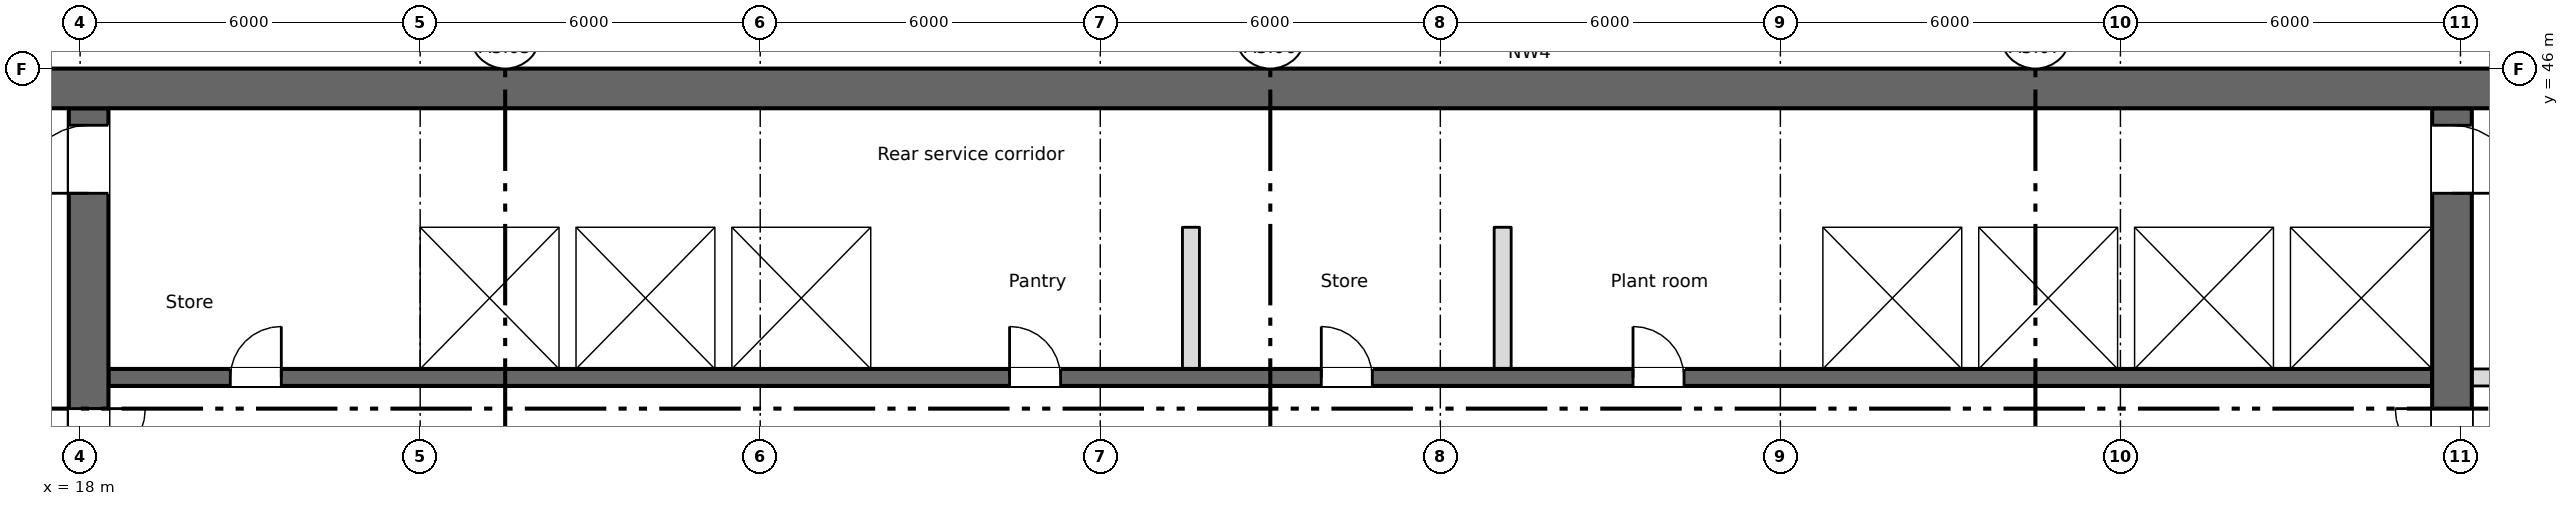
"""IFC4 building model, lengths in metres.
Left out: names, types, materials, properties, quantities, classifications, styles, units other than length and angle.
Written with IfcOpenShell. Run it as: python <this file> out.ifc"""

import sys

from ifc_helpers import new_model, si_unit, direction, frame, frame_2d, origin, place, context, subcontext, project, spatial, rectangle, extrude, element, fill, save


model = new_model("IFC4")
c1 = context("Model", 3, precision=1e-05, world=origin(), true_north=direction((0.0, 1.0)))
c2 = subcontext(c1, "Body", "Model", "MODEL_VIEW")
j1 = project(units=[si_unit("LENGTHUNIT", "METRE"), si_unit("PLANEANGLEUNIT", "RADIAN")], contexts=[c1])
p1 = place(None, origin())
s1 = spatial("IfcSite", under=j1, at=p1, CompositionType="ELEMENT")
p2 = place(p1, origin())
s2 = spatial("IfcBuilding", under=s1, at=p2, CompositionType="ELEMENT")
p3 = place(p2, frame((0.0, 0.0, 208.0)))
s3 = spatial("IfcBuildingStorey", under=s2, at=p3, CompositionType="ELEMENT", Elevation=208.0)
p4 = place(p3, frame((11.55, 45.65, 0.0), z_axis=(0.0, 0.0, 1.0), x_axis=(1.0, 0.0, 0.0)))
e1 = element("IfcWall", 1, at=p4, inside=s3, PredefinedType="SHEAR", context=c2, shape_type="SweptSolid", body=[
    extrude(rectangle(XDim=54.9, YDim=0.7, at=frame_2d((27.45, 0.0))), origin(), (0.0, 0.0, 1.0), 3.35),
])
p5 = place(p3, frame((18.15, 28.4, 0.0), z_axis=(0.0, 0.0, 1.0), x_axis=(0.0, 1.0, 0.0)))
e2 = element("IfcWall", 2, at=p5, inside=s3, PredefinedType="SHEAR", context=c2, shape_type="SweptSolid", body=[
    extrude(rectangle(XDim=16.9, YDim=0.7, at=frame_2d((8.45, 0.0))), origin(), (0.0, 0.0, 1.0), 3.35),
])
p6 = place(p5, frame((9.6, 0.0, 0.0)))
e3 = element("IfcOpeningElement", 3, at=p6, cuts=e2, PredefinedType="OPENING", context=c2, shape_type="SweptSolid", body=[
    extrude(rectangle(XDim=2.0, YDim=2.1, at=frame_2d((1.0, 1.05))), frame((0.0, 0.36, 0.0), z_axis=(0.0, -1.0, 0.0), x_axis=(1.0, 0.0, 0.0)), (0.0, 0.0, 1.0), 0.72),
])
p7 = place(p5, frame((15.4, 0.0, 0.0)))
e4 = element("IfcOpeningElement", 4, at=p7, cuts=e2, PredefinedType="OPENING", context=c2, shape_type="SweptSolid", body=[
    extrude(rectangle(XDim=1.2, YDim=2.1, at=frame_2d((0.6, 1.05))), frame((0.0, 0.36, 0.0), z_axis=(0.0, -1.0, 0.0), x_axis=(1.0, 0.0, 0.0)), (0.0, 0.0, 1.0), 0.72),
])
p8 = place(p3, frame((59.85, 28.4, 0.0), z_axis=(0.0, 0.0, 1.0), x_axis=(0.0, 1.0, 0.0)))
e5 = element("IfcWall", 5, at=p8, inside=s3, PredefinedType="SHEAR", context=c2, shape_type="SweptSolid", body=[
    extrude(rectangle(XDim=16.9, YDim=0.7, at=frame_2d((8.45, 0.0))), origin(), (0.0, 0.0, 1.0), 3.35),
])
p9 = place(p8, frame((9.6, 0.0, 0.0)))
e6 = element("IfcOpeningElement", 6, at=p9, cuts=e5, PredefinedType="OPENING", context=c2, shape_type="SweptSolid", body=[
    extrude(rectangle(XDim=2.0, YDim=2.1, at=frame_2d((1.0, 1.05))), frame((0.0, 0.36, 0.0), z_axis=(0.0, -1.0, 0.0), x_axis=(1.0, 0.0, 0.0)), (0.0, 0.0, 1.0), 0.72),
])
p10 = place(p8, frame((15.4, 0.0, 0.0)))
e7 = element("IfcOpeningElement", 7, at=p10, cuts=e5, PredefinedType="OPENING", context=c2, shape_type="SweptSolid", body=[
    extrude(rectangle(XDim=1.2, YDim=2.1, at=frame_2d((0.6, 1.05))), frame((0.0, 0.36, 0.0), z_axis=(0.0, -1.0, 0.0), x_axis=(1.0, 0.0, 0.0)), (0.0, 0.0, 1.0), 0.72),
])
p11 = place(p3, frame((18.5, 40.55, 0.0), z_axis=(0.0, 0.0, 1.0), x_axis=(1.0, 0.0, 0.0)))
e8 = element("IfcWall", 8, at=p11, inside=s3, PredefinedType="SHEAR", context=c2, shape_type="SweptSolid", body=[
    extrude(rectangle(XDim=41.0, YDim=0.3, at=frame_2d((20.5, 0.0))), origin(), (0.0, 0.0, 1.0), 3.35),
])
p12 = place(p11, frame((2.15, 0.0, 0.0)))
e9 = element("IfcOpeningElement", 9, at=p12, cuts=e8, PredefinedType="OPENING", context=c2, shape_type="SweptSolid", body=[
    extrude(rectangle(XDim=0.9, YDim=2.1, at=frame_2d((0.45, 1.05))), frame((0.0, 0.16, 0.0), z_axis=(0.0, -1.0, 0.0), x_axis=(1.0, 0.0, 0.0)), (0.0, 0.0, 1.0), 0.32),
])
p13 = place(p11, frame((15.9, 0.0, 0.0)))
e10 = element("IfcOpeningElement", 10, at=p13, cuts=e8, PredefinedType="OPENING", context=c2, shape_type="SweptSolid", body=[
    extrude(rectangle(XDim=0.9, YDim=2.1, at=frame_2d((0.45, 1.05))), frame((0.0, 0.16, 0.0), z_axis=(0.0, -1.0, 0.0), x_axis=(1.0, 0.0, 0.0)), (0.0, 0.0, 1.0), 0.32),
])
p14 = place(p11, frame((21.4, 0.0, 0.0)))
e11 = element("IfcOpeningElement", 11, at=p14, cuts=e8, PredefinedType="OPENING", context=c2, shape_type="SweptSolid", body=[
    extrude(rectangle(XDim=0.9, YDim=2.1, at=frame_2d((0.45, 1.05))), frame((0.0, 0.16, 0.0), z_axis=(0.0, -1.0, 0.0), x_axis=(1.0, 0.0, 0.0)), (0.0, 0.0, 1.0), 0.32),
])
p15 = place(p11, frame((26.9, 0.0, 0.0)))
e12 = element("IfcOpeningElement", 12, at=p15, cuts=e8, PredefinedType="OPENING", context=c2, shape_type="SweptSolid", body=[
    extrude(rectangle(XDim=0.9, YDim=2.1, at=frame_2d((0.45, 1.05))), frame((0.0, 0.16, 0.0), z_axis=(0.0, -1.0, 0.0), x_axis=(1.0, 0.0, 0.0)), (0.0, 0.0, 1.0), 0.32),
])
p16 = place(p11, frame((6.175, 0.0, 0.0)))
e13 = element("IfcOpeningElement", 13, at=p16, cuts=e8, PredefinedType="OPENING", context=c2, shape_type="SweptSolid", body=[
    extrude(rectangle(XDim=1.1, YDim=2.1, at=frame_2d((0.55, 1.05))), frame((0.0, 0.16, 0.0), z_axis=(0.0, -1.0, 0.0), x_axis=(1.0, 0.0, 0.0)), (0.0, 0.0, 1.0), 0.32),
])
p17 = place(p11, frame((8.925, 0.0, 0.0)))
e14 = element("IfcOpeningElement", 14, at=p17, cuts=e8, PredefinedType="OPENING", context=c2, shape_type="SweptSolid", body=[
    extrude(rectangle(XDim=1.1, YDim=2.1, at=frame_2d((0.55, 1.05))), frame((0.0, 0.16, 0.0), z_axis=(0.0, -1.0, 0.0), x_axis=(1.0, 0.0, 0.0)), (0.0, 0.0, 1.0), 0.32),
])
p18 = place(p11, frame((11.675, 0.0, 0.0)))
e15 = element("IfcOpeningElement", 15, at=p18, cuts=e8, PredefinedType="OPENING", context=c2, shape_type="SweptSolid", body=[
    extrude(rectangle(XDim=1.1, YDim=2.1, at=frame_2d((0.55, 1.05))), frame((0.0, 0.16, 0.0), z_axis=(0.0, -1.0, 0.0), x_axis=(1.0, 0.0, 0.0)), (0.0, 0.0, 1.0), 0.32),
])
p19 = place(p11, frame((30.925, 0.0, 0.0)))
e16 = element("IfcOpeningElement", 16, at=p19, cuts=e8, PredefinedType="OPENING", context=c2, shape_type="SweptSolid", body=[
    extrude(rectangle(XDim=1.1, YDim=2.1, at=frame_2d((0.55, 1.05))), frame((0.0, 0.16, 0.0), z_axis=(0.0, -1.0, 0.0), x_axis=(1.0, 0.0, 0.0)), (0.0, 0.0, 1.0), 0.32),
])
p20 = place(p11, frame((33.675, 0.0, 0.0)))
e17 = element("IfcOpeningElement", 17, at=p20, cuts=e8, PredefinedType="OPENING", context=c2, shape_type="SweptSolid", body=[
    extrude(rectangle(XDim=1.1, YDim=2.1, at=frame_2d((0.55, 1.05))), frame((0.0, 0.16, 0.0), z_axis=(0.0, -1.0, 0.0), x_axis=(1.0, 0.0, 0.0)), (0.0, 0.0, 1.0), 0.32),
])
p21 = place(p11, frame((36.375, 0.0, 0.0)))
e18 = element("IfcOpeningElement", 18, at=p21, cuts=e8, PredefinedType="OPENING", context=c2, shape_type="SweptSolid", body=[
    extrude(rectangle(XDim=1.2, YDim=2.1, at=frame_2d((0.6, 1.05))), frame((0.0, 0.16, 0.0), z_axis=(0.0, -1.0, 0.0), x_axis=(1.0, 0.0, 0.0)), (0.0, 0.0, 1.0), 0.32),
])
p22 = place(p11, frame((39.15, 0.0, 0.0)))
e19 = element("IfcOpeningElement", 19, at=p22, cuts=e8, PredefinedType="OPENING", context=c2, shape_type="SweptSolid", body=[
    extrude(rectangle(XDim=1.2, YDim=2.1, at=frame_2d((0.6, 1.05))), frame((0.0, 0.16, 0.0), z_axis=(0.0, -1.0, 0.0), x_axis=(1.0, 0.0, 0.0)), (0.0, 0.0, 1.0), 0.32),
])
p23 = place(p3, frame((18.5, 43.35, 0.0), z_axis=(0.0, 0.0, 1.0), x_axis=(1.0, 0.0, 0.0)))
e20 = element("IfcWall", 20, at=p23, inside=s3, PredefinedType="SHEAR", context=c2, shape_type="SweptSolid", body=[
    extrude(rectangle(XDim=41.0, YDim=0.3, at=frame_2d((20.5, 0.0))), origin(), (0.0, 0.0, 1.0), 3.35),
])
p24 = place(p3, frame((60.2, 40.55, 0.0), z_axis=(0.0, 0.0, 1.0), x_axis=(1.0, 0.0, 0.0)))
e21 = element("IfcWall", 21, at=p24, inside=s3, PredefinedType="PARTITIONING", context=c2, shape_type="SweptSolid", body=[
    extrude(rectangle(XDim=2.5, YDim=0.3, at=frame_2d((1.25, 0.0))), origin(), (0.0, 0.0, 1.0), 3.35),
])
p25 = place(p24, frame((0.725, 0.0, 0.0)))
e22 = element("IfcOpeningElement", 22, at=p25, cuts=e21, PredefinedType="OPENING", context=c2, shape_type="SweptSolid", body=[
    extrude(rectangle(XDim=0.9, YDim=2.1, at=frame_2d((0.45, 1.05))), frame((0.0, 0.16, 0.0), z_axis=(0.0, -1.0, 0.0), x_axis=(1.0, 0.0, 0.0)), (0.0, 0.0, 1.0), 0.32),
])
for number, where, z_axis, x_axis in (
    (23, (23.85, 40.7, 0.0), (0.0, 0.0, 1.0), (0.0, 1.0, 0.0)),
    (24, (26.6, 40.7, 0.0), (0.0, 0.0, 1.0), (0.0, 1.0, 0.0)),
    (25, (29.35, 40.7, 0.0), (0.0, 0.0, 1.0), (0.0, 1.0, 0.0)),
    (26, (32.1, 40.7, 0.0), (0.0, 0.0, 1.0), (0.0, 1.0, 0.0)),
    (27, (48.6, 40.7, 0.0), (0.0, 0.0, 1.0), (0.0, 1.0, 0.0)),
    (28, (51.35, 40.7, 0.0), (0.0, 0.0, 1.0), (0.0, 1.0, 0.0)),
    (29, (54.1, 40.7, 0.0), (0.0, 0.0, 1.0), (0.0, 1.0, 0.0)),
    (30, (56.85, 40.7, 0.0), (0.0, 0.0, 1.0), (0.0, 1.0, 0.0)),
):
    element("IfcWall", number, at=place(p3, frame(where, z_axis=z_axis, x_axis=x_axis)), inside=s3, PredefinedType="SHEAR", context=c2, shape_type="SweptSolid", body=[
        extrude(rectangle(XDim=2.5, YDim=0.3, at=frame_2d((1.25, 0.0))), origin(), (0.0, 0.0, 1.0), 3.35),
    ])
for number, where, z_axis, x_axis in (
    (31, (37.6, 40.7, 0.0), (0.0, 0.0, 1.0), (0.0, 1.0, 0.0)),
    (32, (43.1, 40.7, 0.0), (0.0, 0.0, 1.0), (0.0, 1.0, 0.0)),
):
    element("IfcWall", number, at=place(p3, frame(where, z_axis=z_axis, x_axis=x_axis)), inside=s3, PredefinedType="PARTITIONING", context=c2, shape_type="SweptSolid", body=[
        extrude(rectangle(XDim=2.5, YDim=0.3, at=frame_2d((1.25, 0.0))), origin(), (0.0, 0.0, 1.0), 3.35),
    ])
p26 = place(p12, origin())
e33 = element("IfcDoor", 33, at=p26, inside=s3, OperationType="SINGLE_SWING_RIGHT", PredefinedType="DOOR", context=c2, shape_type="SweptSolid", body=[
    extrude(rectangle(XDim=0.9, YDim=2.1, at=frame_2d((0.45, 1.05))), frame((0.0, 0.025, 0.0), z_axis=(0.0, -1.0, 0.0), x_axis=(1.0, 0.0, 0.0)), (0.0, 0.0, 1.0), 0.05),
])
fill(e9, e33)
p27 = place(p13, origin())
e34 = element("IfcDoor", 34, at=p27, inside=s3, OperationType="SINGLE_SWING_LEFT", PredefinedType="DOOR", context=c2, shape_type="SweptSolid", body=[
    extrude(rectangle(XDim=0.9, YDim=2.1, at=frame_2d((0.45, 1.05))), frame((0.0, 0.025, 0.0), z_axis=(0.0, -1.0, 0.0), x_axis=(1.0, 0.0, 0.0)), (0.0, 0.0, 1.0), 0.05),
])
fill(e10, e34)
p28 = place(p14, origin())
e35 = element("IfcDoor", 35, at=p28, inside=s3, OperationType="SINGLE_SWING_LEFT", PredefinedType="DOOR", context=c2, shape_type="SweptSolid", body=[
    extrude(rectangle(XDim=0.9, YDim=2.1, at=frame_2d((0.45, 1.05))), frame((0.0, 0.025, 0.0), z_axis=(0.0, -1.0, 0.0), x_axis=(1.0, 0.0, 0.0)), (0.0, 0.0, 1.0), 0.05),
])
fill(e11, e35)
p29 = place(p15, origin())
e36 = element("IfcDoor", 36, at=p29, inside=s3, OperationType="SINGLE_SWING_LEFT", PredefinedType="DOOR", context=c2, shape_type="SweptSolid", body=[
    extrude(rectangle(XDim=0.9, YDim=2.1, at=frame_2d((0.45, 1.05))), frame((0.0, 0.025, 0.0), z_axis=(0.0, -1.0, 0.0), x_axis=(1.0, 0.0, 0.0)), (0.0, 0.0, 1.0), 0.05),
])
fill(e12, e36)
p30 = place(p16, origin())
e37 = element("IfcDoor", 37, at=p30, inside=s3, OperationType="SLIDING_TO_LEFT", PredefinedType="DOOR", context=c2, shape_type="SweptSolid", body=[
    extrude(rectangle(XDim=1.1, YDim=2.1, at=frame_2d((0.55, 1.05))), frame((0.0, 0.025, 0.0), z_axis=(0.0, -1.0, 0.0), x_axis=(1.0, 0.0, 0.0)), (0.0, 0.0, 1.0), 0.05),
])
fill(e13, e37)
p31 = place(p17, origin())
e38 = element("IfcDoor", 38, at=p31, inside=s3, OperationType="SLIDING_TO_LEFT", PredefinedType="DOOR", context=c2, shape_type="SweptSolid", body=[
    extrude(rectangle(XDim=1.1, YDim=2.1, at=frame_2d((0.55, 1.05))), frame((0.0, 0.025, 0.0), z_axis=(0.0, -1.0, 0.0), x_axis=(1.0, 0.0, 0.0)), (0.0, 0.0, 1.0), 0.05),
])
fill(e14, e38)
p32 = place(p18, origin())
e39 = element("IfcDoor", 39, at=p32, inside=s3, OperationType="SLIDING_TO_LEFT", PredefinedType="DOOR", context=c2, shape_type="SweptSolid", body=[
    extrude(rectangle(XDim=1.1, YDim=2.1, at=frame_2d((0.55, 1.05))), frame((0.0, 0.025, 0.0), z_axis=(0.0, -1.0, 0.0), x_axis=(1.0, 0.0, 0.0)), (0.0, 0.0, 1.0), 0.05),
])
fill(e15, e39)
p33 = place(p19, origin())
e40 = element("IfcDoor", 40, at=p33, inside=s3, OperationType="SLIDING_TO_LEFT", PredefinedType="DOOR", context=c2, shape_type="SweptSolid", body=[
    extrude(rectangle(XDim=1.1, YDim=2.1, at=frame_2d((0.55, 1.05))), frame((0.0, 0.025, 0.0), z_axis=(0.0, -1.0, 0.0), x_axis=(1.0, 0.0, 0.0)), (0.0, 0.0, 1.0), 0.05),
])
fill(e16, e40)
p34 = place(p20, origin())
e41 = element("IfcDoor", 41, at=p34, inside=s3, OperationType="SLIDING_TO_LEFT", PredefinedType="DOOR", context=c2, shape_type="SweptSolid", body=[
    extrude(rectangle(XDim=1.1, YDim=2.1, at=frame_2d((0.55, 1.05))), frame((0.0, 0.025, 0.0), z_axis=(0.0, -1.0, 0.0), x_axis=(1.0, 0.0, 0.0)), (0.0, 0.0, 1.0), 0.05),
])
fill(e17, e41)
p35 = place(p21, origin())
e42 = element("IfcDoor", 42, at=p35, inside=s3, OperationType="SLIDING_TO_LEFT", PredefinedType="DOOR", context=c2, shape_type="SweptSolid", body=[
    extrude(rectangle(XDim=1.2, YDim=2.1, at=frame_2d((0.6, 1.05))), frame((0.0, 0.025, 0.0), z_axis=(0.0, -1.0, 0.0), x_axis=(1.0, 0.0, 0.0)), (0.0, 0.0, 1.0), 0.05),
])
fill(e18, e42)
p36 = place(p22, origin())
e43 = element("IfcDoor", 43, at=p36, inside=s3, OperationType="SLIDING_TO_LEFT", PredefinedType="DOOR", context=c2, shape_type="SweptSolid", body=[
    extrude(rectangle(XDim=1.2, YDim=2.1, at=frame_2d((0.6, 1.05))), frame((0.0, 0.025, 0.0), z_axis=(0.0, -1.0, 0.0), x_axis=(1.0, 0.0, 0.0)), (0.0, 0.0, 1.0), 0.05),
])
fill(e19, e43)
p37 = place(p6, origin())
e44 = element("IfcDoor", 44, at=p37, inside=s3, OperationType="DOUBLE_DOOR_SINGLE_SWING", PredefinedType="DOOR", context=c2, shape_type="SweptSolid", body=[
    extrude(rectangle(XDim=2.0, YDim=2.1, at=frame_2d((1.0, 1.05))), frame((0.0, 0.025, 0.0), z_axis=(0.0, -1.0, 0.0), x_axis=(1.0, 0.0, 0.0)), (0.0, 0.0, 1.0), 0.05),
])
fill(e3, e44)
p38 = place(p9, origin())
e45 = element("IfcDoor", 45, at=p38, inside=s3, OperationType="DOUBLE_DOOR_SINGLE_SWING", PredefinedType="DOOR", context=c2, shape_type="SweptSolid", body=[
    extrude(rectangle(XDim=2.0, YDim=2.1, at=frame_2d((1.0, 1.05))), frame((0.0, 0.025, 0.0), z_axis=(0.0, -1.0, 0.0), x_axis=(1.0, 0.0, 0.0)), (0.0, 0.0, 1.0), 0.05),
])
fill(e6, e45)
p39 = place(p7, origin())
e46 = element("IfcDoor", 46, at=p39, inside=s3, OperationType="SINGLE_SWING_LEFT", PredefinedType="DOOR", context=c2, shape_type="SweptSolid", body=[
    extrude(rectangle(XDim=1.2, YDim=2.1, at=frame_2d((0.6, 1.05))), frame((0.0, 0.025, 0.0), z_axis=(0.0, -1.0, 0.0), x_axis=(1.0, 0.0, 0.0)), (0.0, 0.0, 1.0), 0.05),
])
fill(e4, e46)
p40 = place(p10, origin())
e47 = element("IfcDoor", 47, at=p40, inside=s3, OperationType="SINGLE_SWING_LEFT", PredefinedType="DOOR", context=c2, shape_type="SweptSolid", body=[
    extrude(rectangle(XDim=1.2, YDim=2.1, at=frame_2d((0.6, 1.05))), frame((0.0, 0.025, 0.0), z_axis=(0.0, -1.0, 0.0), x_axis=(1.0, 0.0, 0.0)), (0.0, 0.0, 1.0), 0.05),
])
fill(e7, e47)
save(model, sys.argv[1])
